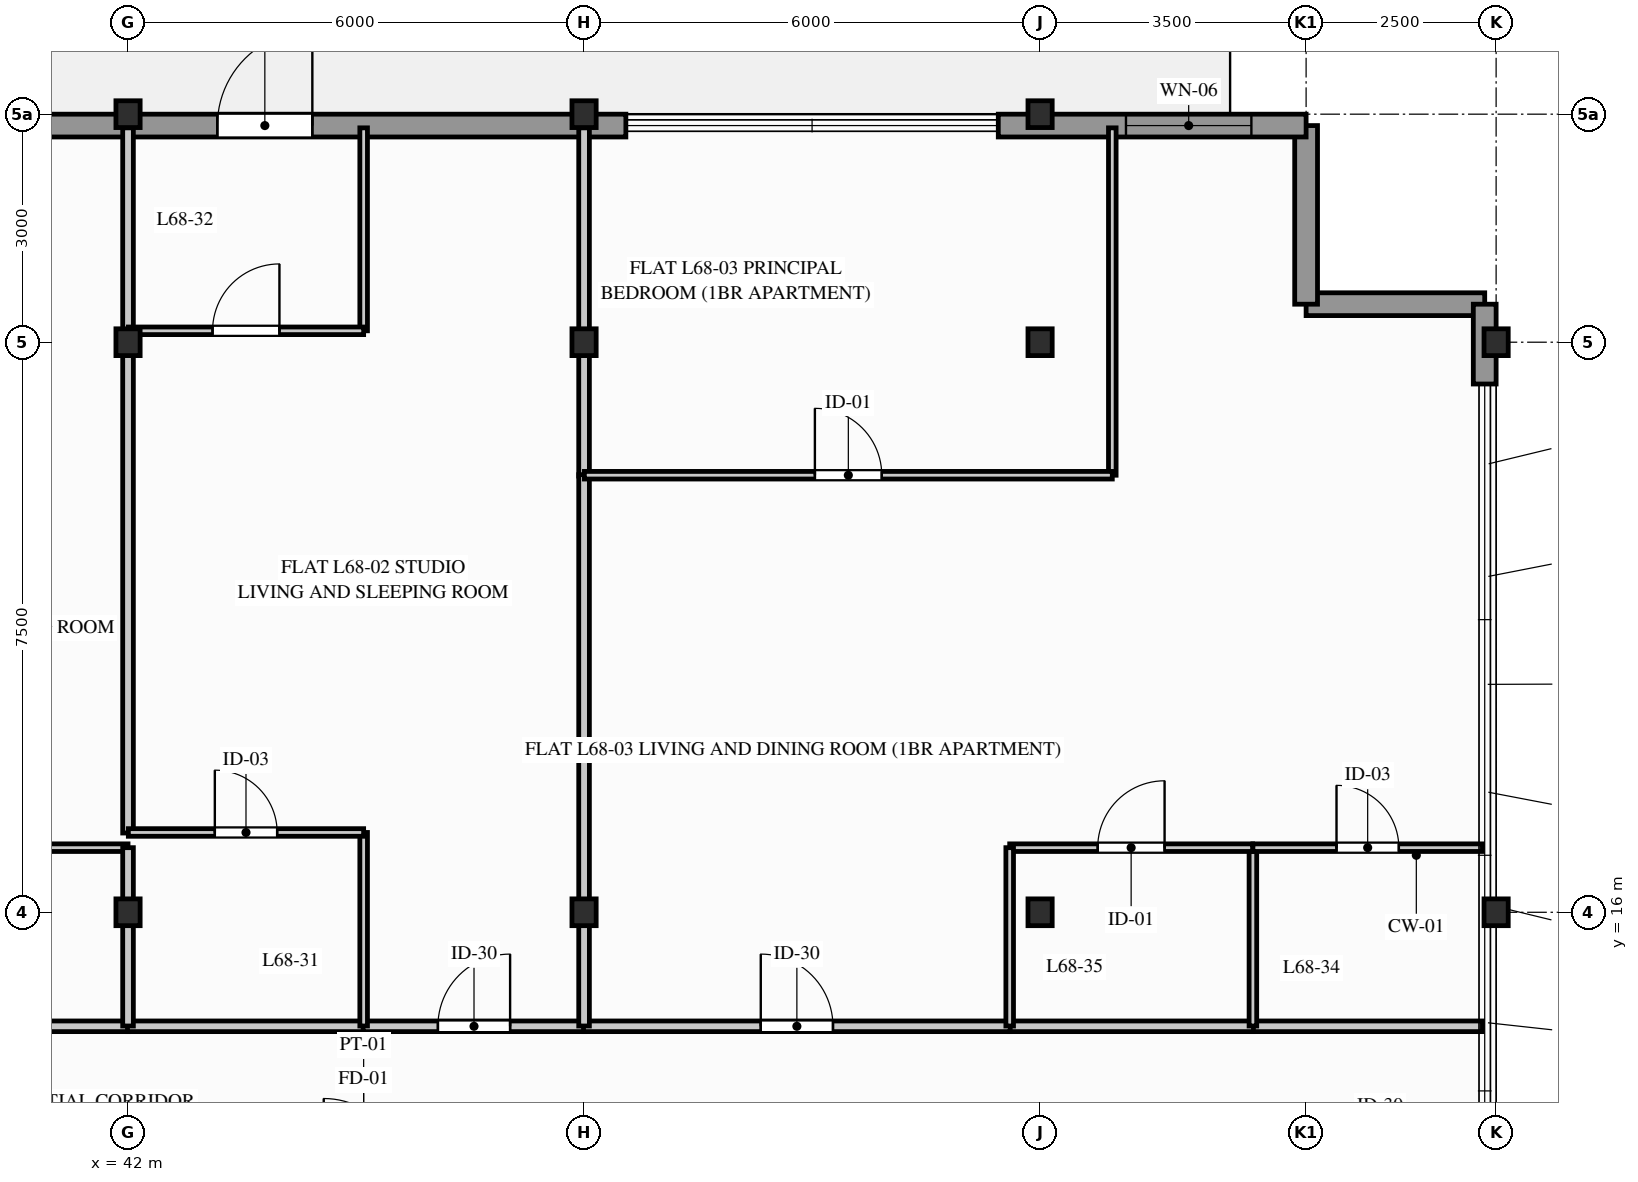
"""IFC4 building model, lengths in metres.
Left out: names, types, materials, properties, quantities, classifications, styles, units other than length and angle.
Written with IfcOpenShell. Run it as: python <this file> out.ifc"""

import sys

from ifc_helpers import new_model, si_unit, direction, frame, frame_2d, origin, origin_2d, place, context, subcontext, project, spatial, rectangle, i_section, extrude, element, fill, save


model = new_model("IFC4")
c1 = context("Model", 3, precision=1e-05, world=origin(), true_north=direction((0.0, 1.0)))
c2 = subcontext(c1, "Body", "Model", "MODEL_VIEW")
j1 = project(units=[si_unit("LENGTHUNIT", "METRE"), si_unit("PLANEANGLEUNIT", "RADIAN")], contexts=[c1])
p1 = place(None, origin())
s1 = spatial("IfcSite", under=j1, at=p1, CompositionType="ELEMENT")
p2 = place(p1, origin())
s2 = spatial("IfcBuilding", under=s1, at=p2, CompositionType="ELEMENT")
p3 = place(p2, frame((0.0, 0.0, 224.2)))
s3 = spatial("IfcBuildingStorey", under=s2, at=p3, CompositionType="ELEMENT", Elevation=224.2)
for number, where, z_axis, x_axis in (
    (1, (42.0, 16.0, 0.0), (0.0, 0.0, 1.0), (1.0, 0.0, 0.0)),
    (2, (42.0, 23.5, 0.0), (0.0, 0.0, 1.0), (1.0, 0.0, 0.0)),
    (3, (42.0, 26.5, 0.0), (0.0, 0.0, 1.0), (1.0, 0.0, 0.0)),
    (4, (48.0, 16.0, 0.0), (0.0, 0.0, 1.0), (1.0, 0.0, 0.0)),
    (5, (48.0, 23.5, 0.0), (0.0, 0.0, 1.0), (1.0, 0.0, 0.0)),
    (6, (48.0, 26.5, 0.0), (0.0, 0.0, 1.0), (1.0, 0.0, 0.0)),
    (7, (54.0, 16.0, 0.0), (0.0, 0.0, 1.0), (1.0, 0.0, 0.0)),
    (8, (54.0, 23.5, 0.0), (0.0, 0.0, 1.0), (1.0, 0.0, 0.0)),
    (9, (54.0, 26.5, 0.0), (0.0, 0.0, 1.0), (1.0, 0.0, 0.0)),
    (10, (60.0, 16.0, 0.0), (0.0, 0.0, 1.0), (1.0, 0.0, 0.0)),
    (11, (60.0, 23.5, 0.0), (0.0, 0.0, 1.0), (1.0, 0.0, 0.0)),
):
    element("IfcColumn", number, at=place(p3, frame(where, z_axis=z_axis, x_axis=x_axis)), inside=s3, PredefinedType="COLUMN", context=c2, shape_type="SweptSolid", body=[
        extrude(i_section(OverallWidth=0.318, OverallDepth=0.353, WebThickness=0.023, FlangeThickness=0.038, FilletRadius=0.015, at=origin_2d()), origin(), (0.0, 0.0, 1.0), 3.1),
    ])
for number, where, z_axis, x_axis in (
    (12, (59.85, 24.0, 0.0), (0.0, 0.0, 1.0), (-1.0, 0.0, 0.0)),
    (13, (57.5, 24.0, 0.0), (0.0, 0.0, 1.0), (0.0, 1.0, 0.0)),
):
    element("IfcWall", number, at=place(p3, frame(where, z_axis=z_axis, x_axis=x_axis)), inside=s3, PredefinedType="STANDARD", context=c2, shape_type="SweptSolid", body=[
        extrude(rectangle(XDim=2.35, YDim=0.3, at=frame_2d((1.175, 0.0))), origin(), (0.0, 0.0, 1.0), 2.89),
    ])
p4 = place(p3, frame((59.85, 22.95, 0.0), z_axis=(0.0, 0.0, 1.0), x_axis=(0.0, 1.0, 0.0)))
e14 = element("IfcWall", 14, at=p4, inside=s3, PredefinedType="STANDARD", context=c2, shape_type="SweptSolid", body=[
    extrude(rectangle(XDim=1.05, YDim=0.3, at=frame_2d((0.525, 0.0))), origin(), (0.0, 0.0, 1.0), 2.89),
])
p5 = place(p3, frame((37.7, 26.35, 0.0), z_axis=(0.0, 0.0, 1.0), x_axis=(1.0, 0.0, 0.0)))
e15 = element("IfcWall", 15, at=p5, inside=s3, PredefinedType="STANDARD", context=c2, shape_type="SweptSolid", body=[
    extrude(rectangle(XDim=10.85, YDim=0.3, at=frame_2d((5.425, 0.0))), origin(), (0.0, 0.0, 1.0), 2.332),
])
p6 = place(p5, frame((5.475, 0.0, 0.0)))
e16 = element("IfcOpeningElement", 16, at=p6, cuts=e15, PredefinedType="OPENING", context=c2, shape_type="SweptSolid", body=[
    extrude(rectangle(XDim=1.25, YDim=2.2, at=frame_2d((0.625, 1.1))), frame((0.0, 0.16, 0.0), z_axis=(0.0, -1.0, 0.0), x_axis=(1.0, 0.0, 0.0)), (0.0, 0.0, 1.0), 0.32),
])
p7 = place(p5, frame((2.081, 0.0, 0.512)))
e17 = element("IfcOpeningElement", 17, at=p7, cuts=e15, PredefinedType="OPENING", context=c2, shape_type="SweptSolid", body=[
    extrude(rectangle(XDim=1.2, YDim=1.6, at=frame_2d((0.6, 0.8))), frame((0.0, 0.16, 0.0), z_axis=(0.0, -1.0, 0.0), x_axis=(1.0, 0.0, 0.0)), (0.0, 0.0, 1.0), 0.32),
])
p8 = place(p3, frame((53.45, 26.35, 0.0), z_axis=(0.0, 0.0, 1.0), x_axis=(1.0, 0.0, 0.0)))
e18 = element("IfcWall", 18, at=p8, inside=s3, PredefinedType="STANDARD", context=c2, shape_type="SweptSolid", body=[
    extrude(rectangle(XDim=4.05, YDim=0.3, at=frame_2d((2.025, 0.0))), origin(), (0.0, 0.0, 1.0), 2.89),
])
p9 = place(p8, frame((1.68, 0.0, 0.77)))
e19 = element("IfcOpeningElement", 19, at=p9, cuts=e18, PredefinedType="OPENING", context=c2, shape_type="SweptSolid", body=[
    extrude(rectangle(XDim=1.65, YDim=1.9, at=frame_2d((0.825, 0.95))), frame((0.0, 0.16, 0.0), z_axis=(0.0, -1.0, 0.0), x_axis=(1.0, 0.0, 0.0)), (0.0, 0.0, 1.0), 0.32),
])
p10 = place(p3, frame((38.389, 14.5, 0.0), z_axis=(0.0, 0.0, 1.0), x_axis=(1.0, 0.0, 0.0)))
e20 = element("IfcWall", 20, at=p10, inside=s3, PredefinedType="PARTITIONING", context=c2, shape_type="SweptSolid", body=[
    extrude(rectangle(XDim=3.623, YDim=0.14, at=frame_2d((1.811, 0.0))), origin(), (0.0, 0.0, 1.0), 2.325),
])
p11 = place(p3, frame((41.993, 14.5, 0.0), z_axis=(0.0, 0.0, 1.0), x_axis=(1.0, 0.0, 0.0)))
e21 = element("IfcWall", 21, at=p11, inside=s3, PredefinedType="PARTITIONING", context=c2, shape_type="SweptSolid", body=[
    extrude(rectangle(XDim=3.119, YDim=0.14, at=frame_2d((1.559, 0.0))), origin(), (0.0, 0.0, 1.0), 2.325),
])
p12 = place(p3, frame((45.093, 14.5, 0.0), z_axis=(0.0, 0.0, 1.0), x_axis=(1.0, 0.0, 0.0)))
e22 = element("IfcWall", 22, at=p12, inside=s3, PredefinedType="PARTITIONING", context=c2, shape_type="SweptSolid", body=[
    extrude(rectangle(XDim=2.918, YDim=0.14, at=frame_2d((1.459, 0.0))), origin(), (0.0, 0.0, 1.0), 2.325),
])
p13 = place(p12, frame((0.984, 0.0, 0.0)))
e23 = element("IfcOpeningElement", 23, at=p13, cuts=e22, PredefinedType="OPENING", context=c2, shape_type="SweptSolid", body=[
    extrude(rectangle(XDim=0.95, YDim=2.05, at=frame_2d((0.475, 1.025))), frame((0.0, 0.08, 0.0), z_axis=(0.0, -1.0, 0.0), x_axis=(1.0, 0.0, 0.0)), (0.0, 0.0, 1.0), 0.16),
])
p14 = place(p3, frame((56.789, 14.5, 0.0), z_axis=(0.0, 0.0, 1.0), x_axis=(1.0, 0.0, 0.0)))
e24 = element("IfcWall", 24, at=p14, inside=s3, PredefinedType="PARTITIONING", context=c2, shape_type="SweptSolid", body=[
    extrude(rectangle(XDim=3.031, YDim=0.14, at=frame_2d((1.516, 0.0))), origin(), (0.0, 0.0, 1.0), 2.89),
])
p15 = place(p3, frame((53.589, 14.5, 0.0), z_axis=(0.0, 0.0, 1.0), x_axis=(1.0, 0.0, 0.0)))
e25 = element("IfcWall", 25, at=p15, inside=s3, PredefinedType="PARTITIONING", context=c2, shape_type="SweptSolid", body=[
    extrude(rectangle(XDim=3.219, YDim=0.14, at=frame_2d((1.609, 0.0))), origin(), (0.0, 0.0, 1.0), 2.325),
])
p16 = place(p3, frame((47.993, 14.5, 0.0), z_axis=(0.0, 0.0, 1.0), x_axis=(1.0, 0.0, 0.0)))
e26 = element("IfcWall", 26, at=p16, inside=s3, PredefinedType="PARTITIONING", context=c2, shape_type="SweptSolid", body=[
    extrude(rectangle(XDim=5.615, YDim=0.14, at=frame_2d((2.807, 0.0))), origin(), (0.0, 0.0, 1.0), 2.325),
])
p17 = place(p16, frame((2.332, 0.0, 0.0)))
e27 = element("IfcOpeningElement", 27, at=p17, cuts=e26, PredefinedType="OPENING", context=c2, shape_type="SweptSolid", body=[
    extrude(rectangle(XDim=0.95, YDim=2.05, at=frame_2d((0.475, 1.025))), frame((0.0, 0.08, 0.0), z_axis=(0.0, -1.0, 0.0), x_axis=(1.0, 0.0, 0.0)), (0.0, 0.0, 1.0), 0.16),
])
p18 = place(p3, frame((38.4, 16.85, 0.0), z_axis=(0.0, 0.0, 1.0), x_axis=(1.0, 0.0, 0.0)))
e28 = element("IfcWall", 28, at=p18, inside=s3, PredefinedType="PARTITIONING", context=c2, shape_type="SweptSolid", body=[
    extrude(rectangle(XDim=3.6, YDim=0.1, at=frame_2d((1.8, 0.0))), origin(), (0.0, 0.0, 1.0), 2.325),
])
p19 = place(p18, frame((1.39, 0.0, 0.0)))
e29 = element("IfcOpeningElement", 29, at=p19, cuts=e28, PredefinedType="OPENING", context=c2, shape_type="SweptSolid", body=[
    extrude(rectangle(XDim=0.82, YDim=2.02, at=frame_2d((0.41, 1.01))), frame((0.0, 0.06, 0.0), z_axis=(0.0, -1.0, 0.0), x_axis=(1.0, 0.0, 0.0)), (0.0, 0.0, 1.0), 0.12),
])
p20 = place(p3, frame((42.0, 14.504, 0.0), z_axis=(0.0, 0.0, 1.0), x_axis=(0.0, 1.0, 0.0)))
e30 = element("IfcWall", 30, at=p20, inside=s3, PredefinedType="PARTITIONING", context=c2, shape_type="SweptSolid", body=[
    extrude(rectangle(XDim=2.346, YDim=0.14, at=frame_2d((1.173, 0.0))), origin(), (0.0, 0.0, 1.0), 2.325),
])
p21 = place(p3, frame((42.0, 23.639, 0.0), z_axis=(0.0, 0.0, 1.0), x_axis=(0.0, 1.0, 0.0)))
e31 = element("IfcWall", 31, at=p21, inside=s3, PredefinedType="PARTITIONING", context=c2, shape_type="SweptSolid", body=[
    extrude(rectangle(XDim=2.681, YDim=0.14, at=frame_2d((1.341, 0.0))), origin(), (0.0, 0.0, 1.0), 2.325),
])
p22 = place(p3, frame((42.0, 17.043, 0.0), z_axis=(0.0, 0.0, 1.0), x_axis=(0.0, 1.0, 0.0)))
e32 = element("IfcWall", 32, at=p22, inside=s3, PredefinedType="PARTITIONING", context=c2, shape_type="SweptSolid", body=[
    extrude(rectangle(XDim=6.615, YDim=0.14, at=frame_2d((3.307, 0.0))), origin(), (0.0, 0.0, 1.0), 2.325),
])
p23 = place(p3, frame((45.1, 14.504, 0.0), z_axis=(0.0, 0.0, 1.0), x_axis=(0.0, 1.0, 0.0)))
e33 = element("IfcWall", 33, at=p23, inside=s3, PredefinedType="PARTITIONING", context=c2, shape_type="SweptSolid", body=[
    extrude(rectangle(XDim=2.546, YDim=0.1, at=frame_2d((1.273, 0.0))), origin(), (0.0, 0.0, 1.0), 2.325),
])
p24 = place(p3, frame((42.004, 17.05, 0.0), z_axis=(0.0, 0.0, 1.0), x_axis=(1.0, 0.0, 0.0)))
e34 = element("IfcWall", 34, at=p24, inside=s3, PredefinedType="PARTITIONING", context=c2, shape_type="SweptSolid", body=[
    extrude(rectangle(XDim=3.096, YDim=0.1, at=frame_2d((1.548, 0.0))), origin(), (0.0, 0.0, 1.0), 2.325),
])
p25 = place(p24, frame((1.138, 0.0, 0.0)))
e35 = element("IfcOpeningElement", 35, at=p25, cuts=e34, PredefinedType="OPENING", context=c2, shape_type="SweptSolid", body=[
    extrude(rectangle(XDim=0.82, YDim=2.02, at=frame_2d((0.41, 1.01))), frame((0.0, 0.06, 0.0), z_axis=(0.0, -1.0, 0.0), x_axis=(1.0, 0.0, 0.0)), (0.0, 0.0, 1.0), 0.12),
])
p26 = place(p3, frame((45.1, 23.65, 0.0), z_axis=(0.0, 0.0, 1.0), x_axis=(0.0, 1.0, 0.0)))
e36 = element("IfcWall", 36, at=p26, inside=s3, PredefinedType="PARTITIONING", context=c2, shape_type="SweptSolid", body=[
    extrude(rectangle(XDim=2.67, YDim=0.1, at=frame_2d((1.335, 0.0))), origin(), (0.0, 0.0, 1.0), 2.89),
])
p27 = place(p3, frame((42.004, 23.65, 0.0), z_axis=(0.0, 0.0, 1.0), x_axis=(1.0, 0.0, 0.0)))
e37 = element("IfcWall", 37, at=p27, inside=s3, PredefinedType="PARTITIONING", context=c2, shape_type="SweptSolid", body=[
    extrude(rectangle(XDim=3.096, YDim=0.1, at=frame_2d((1.548, 0.0))), origin(), (0.0, 0.0, 1.0), 2.325),
])
p28 = place(p27, frame((1.108, 0.0, 0.0)))
e38 = element("IfcOpeningElement", 38, at=p28, cuts=e37, PredefinedType="OPENING", context=c2, shape_type="SweptSolid", body=[
    extrude(rectangle(XDim=0.88, YDim=2.04, at=frame_2d((0.44, 1.02))), frame((0.0, 0.06, 0.0), z_axis=(0.0, -1.0, 0.0), x_axis=(1.0, 0.0, 0.0)), (0.0, 0.0, 1.0), 0.12),
])
p29 = place(p3, frame((48.0, 21.739, 0.0), z_axis=(0.0, 0.0, 1.0), x_axis=(0.0, 1.0, 0.0)))
e39 = element("IfcWall", 39, at=p29, inside=s3, PredefinedType="PARTITIONING", context=c2, shape_type="SweptSolid", body=[
    extrude(rectangle(XDim=4.581, YDim=0.14, at=frame_2d((2.291, 0.0))), origin(), (0.0, 0.0, 1.0), 2.325),
])
p30 = place(p3, frame((48.0, 14.504, 0.0), z_axis=(0.0, 0.0, 1.0), x_axis=(0.0, 1.0, 0.0)))
e40 = element("IfcWall", 40, at=p30, inside=s3, PredefinedType="PARTITIONING", context=c2, shape_type="SweptSolid", body=[
    extrude(rectangle(XDim=7.253, YDim=0.14, at=frame_2d((3.627, 0.0))), origin(), (0.0, 0.0, 1.0), 2.325),
])
p31 = place(p3, frame((56.8, 14.504, 0.0), z_axis=(0.0, 0.0, 1.0), x_axis=(0.0, 1.0, 0.0)))
e41 = element("IfcWall", 41, at=p31, inside=s3, PredefinedType="PARTITIONING", context=c2, shape_type="SweptSolid", body=[
    extrude(rectangle(XDim=2.346, YDim=0.1, at=frame_2d((1.173, 0.0))), origin(), (0.0, 0.0, 1.0), 2.325),
])
p32 = place(p3, frame((56.8, 16.85, 0.0), z_axis=(0.0, 0.0, 1.0), x_axis=(1.0, 0.0, 0.0)))
e42 = element("IfcWall", 42, at=p32, inside=s3, PredefinedType="PARTITIONING", context=c2, shape_type="SweptSolid", body=[
    extrude(rectangle(XDim=3.02, YDim=0.1, at=frame_2d((1.51, 0.0))), origin(), (0.0, 0.0, 1.0), 2.89),
])
p33 = place(p32, frame((1.1, 0.0, 0.0)))
e43 = element("IfcOpeningElement", 43, at=p33, cuts=e42, PredefinedType="OPENING", context=c2, shape_type="SweptSolid", body=[
    extrude(rectangle(XDim=0.82, YDim=2.02, at=frame_2d((0.41, 1.01))), frame((0.0, 0.06, 0.0), z_axis=(0.0, -1.0, 0.0), x_axis=(1.0, 0.0, 0.0)), (0.0, 0.0, 1.0), 0.12),
])
p34 = place(p3, frame((53.6, 16.85, 0.0), z_axis=(0.0, 0.0, 1.0), x_axis=(1.0, 0.0, 0.0)))
e44 = element("IfcWall", 44, at=p34, inside=s3, PredefinedType="PARTITIONING", context=c2, shape_type="SweptSolid", body=[
    extrude(rectangle(XDim=3.196, YDim=0.1, at=frame_2d((1.598, 0.0))), origin(), (0.0, 0.0, 1.0), 2.325),
])
p35 = place(p34, frame((1.158, 0.0, 0.0)))
e45 = element("IfcOpeningElement", 45, at=p35, cuts=e44, PredefinedType="OPENING", context=c2, shape_type="SweptSolid", body=[
    extrude(rectangle(XDim=0.88, YDim=2.04, at=frame_2d((0.44, 1.02))), frame((0.0, 0.06, 0.0), z_axis=(0.0, -1.0, 0.0), x_axis=(1.0, 0.0, 0.0)), (0.0, 0.0, 1.0), 0.12),
])
p36 = place(p3, frame((53.6, 14.504, 0.0), z_axis=(0.0, 0.0, 1.0), x_axis=(0.0, 1.0, 0.0)))
e46 = element("IfcWall", 46, at=p36, inside=s3, PredefinedType="PARTITIONING", context=c2, shape_type="SweptSolid", body=[
    extrude(rectangle(XDim=2.346, YDim=0.1, at=frame_2d((1.173, 0.0))), origin(), (0.0, 0.0, 1.0), 2.325),
])
p37 = place(p3, frame((54.95, 21.75, 0.0), z_axis=(0.0, 0.0, 1.0), x_axis=(0.0, 1.0, 0.0)))
e47 = element("IfcWall", 47, at=p37, inside=s3, PredefinedType="PARTITIONING", context=c2, shape_type="SweptSolid", body=[
    extrude(rectangle(XDim=4.57, YDim=0.1, at=frame_2d((2.285, 0.0))), origin(), (0.0, 0.0, 1.0), 2.325),
])
p38 = place(p3, frame((48.004, 21.75, 0.0), z_axis=(0.0, 0.0, 1.0), x_axis=(1.0, 0.0, 0.0)))
e48 = element("IfcWall", 48, at=p38, inside=s3, PredefinedType="PARTITIONING", context=c2, shape_type="SweptSolid", body=[
    extrude(rectangle(XDim=6.946, YDim=0.1, at=frame_2d((3.473, 0.0))), origin(), (0.0, 0.0, 1.0), 2.325),
])
p39 = place(p38, frame((3.033, 0.0, 0.0)))
e49 = element("IfcOpeningElement", 49, at=p39, cuts=e48, PredefinedType="OPENING", context=c2, shape_type="SweptSolid", body=[
    extrude(rectangle(XDim=0.88, YDim=2.04, at=frame_2d((0.44, 1.02))), frame((0.0, 0.06, 0.0), z_axis=(0.0, -1.0, 0.0), x_axis=(1.0, 0.0, 0.0)), (0.0, 0.0, 1.0), 0.12),
])
p40 = place(p6, origin())
e50 = element("IfcDoor", 50, at=p40, inside=s3, OperationType="SINGLE_SWING_RIGHT", PredefinedType="DOOR", context=c2, shape_type="SweptSolid", body=[
    extrude(rectangle(XDim=1.25, YDim=2.2, at=frame_2d((0.625, 1.1))), frame((0.0, 0.025, 0.0), z_axis=(0.0, -1.0, 0.0), x_axis=(1.0, 0.0, 0.0)), (0.0, 0.0, 1.0), 0.05),
])
fill(e16, e50)
p41 = place(p9, origin())
e51 = element("IfcWindow", 51, at=p41, inside=s3, PartitioningType="SINGLE_PANEL", PredefinedType="WINDOW", context=c2, shape_type="SweptSolid", body=[
    extrude(rectangle(XDim=1.65, YDim=1.9, at=frame_2d((0.825, 0.95))), frame((0.0, 0.03, 0.0), z_axis=(0.0, -1.0, 0.0), x_axis=(1.0, 0.0, 0.0)), (0.0, 0.0, 1.0), 0.06),
])
fill(e19, e51)
p42 = place(p13, origin())
e52 = element("IfcDoor", 52, at=p42, inside=s3, OperationType="SINGLE_SWING_RIGHT", PredefinedType="DOOR", context=c2, shape_type="SweptSolid", body=[
    extrude(rectangle(XDim=0.95, YDim=2.05, at=frame_2d((0.475, 1.025))), frame((0.0, 0.025, 0.0), z_axis=(0.0, -1.0, 0.0), x_axis=(1.0, 0.0, 0.0)), (0.0, 0.0, 1.0), 0.05),
])
fill(e23, e52)
p43 = place(p17, origin())
e53 = element("IfcDoor", 53, at=p43, inside=s3, OperationType="SINGLE_SWING_LEFT", PredefinedType="DOOR", context=c2, shape_type="SweptSolid", body=[
    extrude(rectangle(XDim=0.95, YDim=2.05, at=frame_2d((0.475, 1.025))), frame((0.0, 0.025, 0.0), z_axis=(0.0, -1.0, 0.0), x_axis=(1.0, 0.0, 0.0)), (0.0, 0.0, 1.0), 0.05),
])
fill(e27, e53)
p44 = place(p25, origin())
e54 = element("IfcDoor", 54, at=p44, inside=s3, OperationType="SINGLE_SWING_LEFT", PredefinedType="DOOR", context=c2, shape_type="SweptSolid", body=[
    extrude(rectangle(XDim=0.82, YDim=2.02, at=frame_2d((0.41, 1.01))), frame((0.0, 0.025, 0.0), z_axis=(0.0, -1.0, 0.0), x_axis=(1.0, 0.0, 0.0)), (0.0, 0.0, 1.0), 0.05),
])
fill(e35, e54)
p45 = place(p28, origin())
e55 = element("IfcDoor", 55, at=p45, inside=s3, OperationType="SINGLE_SWING_RIGHT", PredefinedType="DOOR", context=c2, shape_type="SweptSolid", body=[
    extrude(rectangle(XDim=0.88, YDim=2.04, at=frame_2d((0.44, 1.02))), frame((0.0, 0.025, 0.0), z_axis=(0.0, -1.0, 0.0), x_axis=(1.0, 0.0, 0.0)), (0.0, 0.0, 1.0), 0.05),
])
fill(e38, e55)
p46 = place(p33, origin())
e56 = element("IfcDoor", 56, at=p46, inside=s3, OperationType="SINGLE_SWING_LEFT", PredefinedType="DOOR", context=c2, shape_type="SweptSolid", body=[
    extrude(rectangle(XDim=0.82, YDim=2.02, at=frame_2d((0.41, 1.01))), frame((0.0, 0.025, 0.0), z_axis=(0.0, -1.0, 0.0), x_axis=(1.0, 0.0, 0.0)), (0.0, 0.0, 1.0), 0.05),
])
fill(e43, e56)
p47 = place(p35, origin())
e57 = element("IfcDoor", 57, at=p47, inside=s3, OperationType="SINGLE_SWING_RIGHT", PredefinedType="DOOR", context=c2, shape_type="SweptSolid", body=[
    extrude(rectangle(XDim=0.88, YDim=2.04, at=frame_2d((0.44, 1.02))), frame((0.0, 0.025, 0.0), z_axis=(0.0, -1.0, 0.0), x_axis=(1.0, 0.0, 0.0)), (0.0, 0.0, 1.0), 0.05),
])
fill(e45, e57)
p48 = place(p39, origin())
e58 = element("IfcDoor", 58, at=p48, inside=s3, OperationType="SINGLE_SWING_LEFT", PredefinedType="DOOR", context=c2, shape_type="SweptSolid", body=[
    extrude(rectangle(XDim=0.88, YDim=2.04, at=frame_2d((0.44, 1.02))), frame((0.0, 0.025, 0.0), z_axis=(0.0, -1.0, 0.0), x_axis=(1.0, 0.0, 0.0)), (0.0, 0.0, 1.0), 0.05),
])
fill(e49, e58)
save(model, sys.argv[1])
